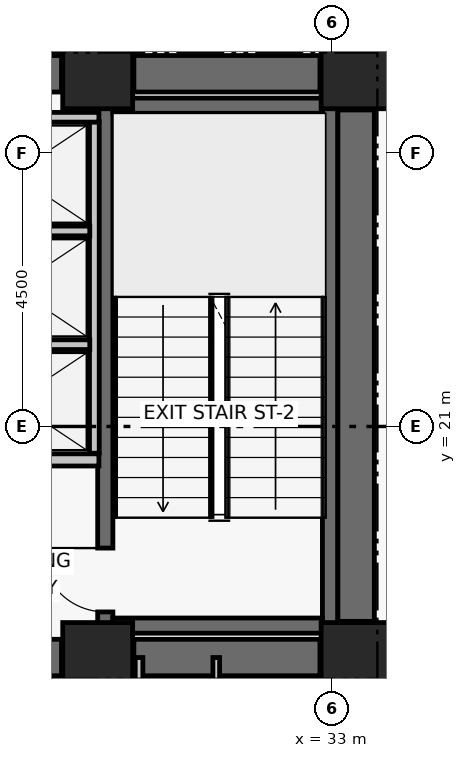
"""IFC4 building model, lengths in metres.
Left out: names, types, materials, properties, quantities, classifications, styles, units other than length and angle.
Written with IfcOpenShell. Run it as: python <this file> out.ifc"""

import sys

from ifc_helpers import new_model, si_unit, direction, frame, frame_2d, origin, origin_2d, place, context, subcontext, project, spatial, rectangle, extrude, element, fill, save


model = new_model("IFC4")
c1 = context("Model", 3, precision=1e-05, world=origin(), true_north=direction((0.0, 1.0)))
c2 = subcontext(c1, "Body", "Model", "MODEL_VIEW")
j1 = project(units=[si_unit("LENGTHUNIT", "METRE"), si_unit("PLANEANGLEUNIT", "RADIAN")], contexts=[c1])
p1 = place(None, origin())
s1 = spatial("IfcSite", under=j1, at=p1, CompositionType="ELEMENT")
p2 = place(p1, origin())
s2 = spatial("IfcBuilding", under=s1, at=p2, CompositionType="ELEMENT")
p3 = place(p2, frame((0.0, 0.0, 38.76)))
s3 = spatial("IfcBuildingStorey", under=s2, at=p3, CompositionType="ELEMENT", Elevation=38.76)
for number, where, z_axis, x_axis in (
    (1, (29.15, 17.2, 0.0), (0.0, 0.0, 1.0), (1.0, 0.0, 0.0)),
    (2, (33.4, 17.2, 0.0), (0.0, 0.0, 1.0), (1.0, 0.0, 0.0)),
    (3, (29.15, 26.8, 0.0), (0.0, 0.0, 1.0), (1.0, 0.0, 0.0)),
    (4, (33.4, 26.8, 0.0), (0.0, 0.0, 1.0), (1.0, 0.0, 0.0)),
):
    element("IfcColumn", number, at=place(p3, frame(where, z_axis=z_axis, x_axis=x_axis)), inside=s3, PredefinedType="COLUMN", context=c2, shape_type="SweptSolid", body=[
        extrude(rectangle(XDim=1.15, YDim=1.15, at=origin_2d()), origin(), (0.0, 0.0, 1.0), 3.72),
    ])
p4 = place(p3, frame((26.85, 17.2, 0.0), z_axis=(0.0, 0.0, 1.0), x_axis=(1.0, 0.0, 0.0)))
e5 = element("IfcWall", 5, at=p4, inside=s3, PredefinedType="SHEAR", context=c2, shape_type="SweptSolid", body=[
    extrude(rectangle(XDim=1.705, YDim=0.6, at=frame_2d((0.853, 0.0))), origin(), (0.0, 0.0, 1.0), 3.47),
])
p5 = place(p3, frame((29.745, 17.2, 0.0), z_axis=(0.0, 0.0, 1.0), x_axis=(1.0, 0.0, 0.0)))
e6 = element("IfcWall", 6, at=p5, inside=s3, PredefinedType="SHEAR", context=c2, shape_type="SweptSolid", body=[
    extrude(rectangle(XDim=3.06, YDim=0.6, at=frame_2d((1.53, 0.0))), origin(), (0.0, 0.0, 1.0), 3.47),
])
p6 = place(p3, frame((26.85, 26.8, 0.0), z_axis=(0.0, 0.0, 1.0), x_axis=(1.0, 0.0, 0.0)))
e7 = element("IfcWall", 7, at=p6, inside=s3, PredefinedType="SHEAR", context=c2, shape_type="SweptSolid", body=[
    extrude(rectangle(XDim=1.705, YDim=0.6, at=frame_2d((0.853, 0.0))), origin(), (0.0, 0.0, 1.0), 3.47),
])
p7 = place(p3, frame((29.745, 26.8, 0.0), z_axis=(0.0, 0.0, 1.0), x_axis=(1.0, 0.0, 0.0)))
e8 = element("IfcWall", 8, at=p7, inside=s3, PredefinedType="SHEAR", context=c2, shape_type="SweptSolid", body=[
    extrude(rectangle(XDim=3.06, YDim=0.6, at=frame_2d((1.53, 0.0))), origin(), (0.0, 0.0, 1.0), 3.47),
])
p8 = place(p3, frame((33.4, 17.795, 0.0), z_axis=(0.0, 0.0, 1.0), x_axis=(0.0, 1.0, 0.0)))
e9 = element("IfcWall", 9, at=p8, inside=s3, PredefinedType="SHEAR", context=c2, shape_type="SweptSolid", body=[
    extrude(rectangle(XDim=8.41, YDim=0.6, at=frame_2d((4.205, 0.0))), origin(), (0.0, 0.0, 1.0), 3.47),
])
p9 = place(p3, frame((29.275, 17.6, 0.0), z_axis=(0.0, 0.0, 1.0), x_axis=(0.0, 1.0, 0.0)))
e10 = element("IfcWall", 10, at=p9, inside=s3, PredefinedType="SHEAR", context=c2, shape_type="SweptSolid", body=[
    extrude(rectangle(XDim=8.8, YDim=0.25, at=frame_2d((4.4, 0.0))), origin(), (0.0, 0.0, 1.0), 3.47),
])
p10 = place(p9, frame((0.35, 0.0, 0.0)))
e11 = element("IfcOpeningElement", 11, at=p10, cuts=e10, PredefinedType="OPENING", context=c2, shape_type="SweptSolid", body=[
    extrude(rectangle(XDim=1.05, YDim=2.08, at=frame_2d((0.525, 1.04))), frame((0.0, 0.135, 0.0), z_axis=(0.0, -1.0, 0.0), x_axis=(1.0, 0.0, 0.0)), (0.0, 0.0, 1.0), 0.27),
])
p11 = place(p3, frame((32.971, 17.6, 0.0), z_axis=(0.0, 0.0, 1.0), x_axis=(0.0, 1.0, 0.0)))
e12 = element("IfcWall", 12, at=p11, inside=s3, PredefinedType="SHEAR", context=c2, shape_type="SweptSolid", body=[
    extrude(rectangle(XDim=8.8, YDim=0.25, at=frame_2d((4.4, 0.0))), origin(), (0.0, 0.0, 1.0), 3.47),
])
for number, where, z_axis, x_axis in (
    (13, (29.4, 17.725, 0.0), (0.0, 0.0, 1.0), (1.0, 0.0, 0.0)),
    (14, (29.4, 26.275, 0.0), (0.0, 0.0, 1.0), (1.0, 0.0, 0.0)),
):
    element("IfcWall", number, at=place(p3, frame(where, z_axis=z_axis, x_axis=x_axis)), inside=s3, PredefinedType="SHEAR", context=c2, shape_type="SweptSolid", body=[
        extrude(rectangle(XDim=3.446, YDim=0.25, at=frame_2d((1.723, 0.0))), origin(), (0.0, 0.0, 1.0), 3.47),
    ])
p12 = place(p3, frame((26.37, 20.45, 0.0), z_axis=(0.0, 0.0, 1.0), x_axis=(1.0, 0.0, 0.0)))
e15 = element("IfcWall", 15, at=p12, inside=s3, PredefinedType="PARTITIONING", context=c2, shape_type="SweptSolid", body=[
    extrude(rectangle(XDim=2.8, YDim=0.2, at=frame_2d((1.4, 0.0))), origin(), (0.0, 0.0, 1.0), 3.47),
])
p13 = place(p12, frame((0.78, 0.0, 0.0)))
e16 = element("IfcOpeningElement", 16, at=p13, cuts=e15, PredefinedType="OPENING", context=c2, shape_type="SweptSolid", body=[
    extrude(rectangle(XDim=1.1, YDim=2.08, at=frame_2d((0.55, 1.04))), frame((0.0, 0.11, 0.0), z_axis=(0.0, -1.0, 0.0), x_axis=(1.0, 0.0, 0.0)), (0.0, 0.0, 1.0), 0.22),
])
p14 = place(p3, frame((29.095, 20.56, 0.0), z_axis=(0.0, 0.0, 1.0), x_axis=(0.0, 1.0, 0.0)))
e17 = element("IfcWall", 17, at=p14, inside=s3, PredefinedType="PARTITIONING", context=c2, shape_type="SweptSolid", body=[
    extrude(rectangle(XDim=5.45, YDim=0.16, at=frame_2d((2.725, 0.0))), origin(), (0.0, 0.0, 1.0), 3.47),
])
p15 = place(p3, frame((26.37, 22.345, 0.0), z_axis=(0.0, 0.0, 1.0), x_axis=(1.0, 0.0, 0.0)))
e18 = element("IfcWall", 18, at=p15, inside=s3, PredefinedType="PARTITIONING", context=c2, shape_type="SweptSolid", body=[
    extrude(rectangle(XDim=2.65, YDim=0.16, at=frame_2d((1.325, 0.0))), origin(), (0.0, 0.0, 1.0), 3.47),
])
p16 = place(p3, frame((26.53, 24.215, 0.0), z_axis=(0.0, 0.0, 1.0), x_axis=(1.0, 0.0, 0.0)))
e19 = element("IfcWall", 19, at=p16, inside=s3, PredefinedType="PARTITIONING", context=c2, shape_type="SweptSolid", body=[
    extrude(rectangle(XDim=2.49, YDim=0.16, at=frame_2d((1.245, 0.0))), origin(), (0.0, 0.0, 1.0), 3.47),
])
p17 = place(p3, frame((26.34, 26.085, 0.0), z_axis=(0.0, 0.0, 1.0), x_axis=(1.0, 0.0, 0.0)))
e20 = element("IfcWall", 20, at=p17, inside=s3, PredefinedType="PARTITIONING", context=c2, shape_type="SweptSolid", body=[
    extrude(rectangle(XDim=2.83, YDim=0.16, at=frame_2d((1.415, 0.0))), origin(), (0.0, 0.0, 1.0), 3.47),
])
p18 = place(p3, frame((29.83, 14.95, 0.0), z_axis=(0.0, 0.0, 1.0), x_axis=(0.0, 1.0, 0.0)))
e21 = element("IfcWall", 21, at=p18, inside=s3, PredefinedType="PARTITIONING", context=c2, shape_type="SweptSolid", body=[
    extrude(rectangle(XDim=2.25, YDim=0.125, at=frame_2d((1.125, 0.0))), origin(), (0.0, 0.0, 1.0), 2.6),
])
p19 = place(p3, frame((31.1, 14.95, 0.0), z_axis=(0.0, 0.0, 1.0), x_axis=(0.0, 1.0, 0.0)))
e22 = element("IfcWall", 22, at=p19, inside=s3, PredefinedType="PARTITIONING", context=c2, shape_type="SweptSolid", body=[
    extrude(rectangle(XDim=2.25, YDim=0.11, at=frame_2d((1.125, 0.0))), origin(), (0.0, 0.0, 1.0), 2.6),
])
p20 = place(p3, frame((33.74, 27.22, 0.0), z_axis=(0.0, 0.0, 1.0), x_axis=(-1.0, 0.0, 0.0)))
e23 = element("IfcWall", 23, at=p20, inside=s3, PredefinedType="PARTITIONING", context=c2, shape_type="SweptSolid", body=[
    extrude(rectangle(XDim=0.86, YDim=0.145, at=frame_2d((0.43, 0.0))), origin(), (0.0, 0.0, 1.0), 2.6),
])
p21 = place(p10, origin())
e24 = element("IfcDoor", 24, at=p21, inside=s3, OperationType="SINGLE_SWING_RIGHT", PredefinedType="DOOR", context=c2, shape_type="SweptSolid", body=[
    extrude(rectangle(XDim=1.05, YDim=2.08, at=frame_2d((0.525, 1.04))), frame((0.0, 0.025, 0.0), z_axis=(0.0, -1.0, 0.0), x_axis=(1.0, 0.0, 0.0)), (0.0, 0.0, 1.0), 0.05),
])
fill(e11, e24)
save(model, sys.argv[1])
